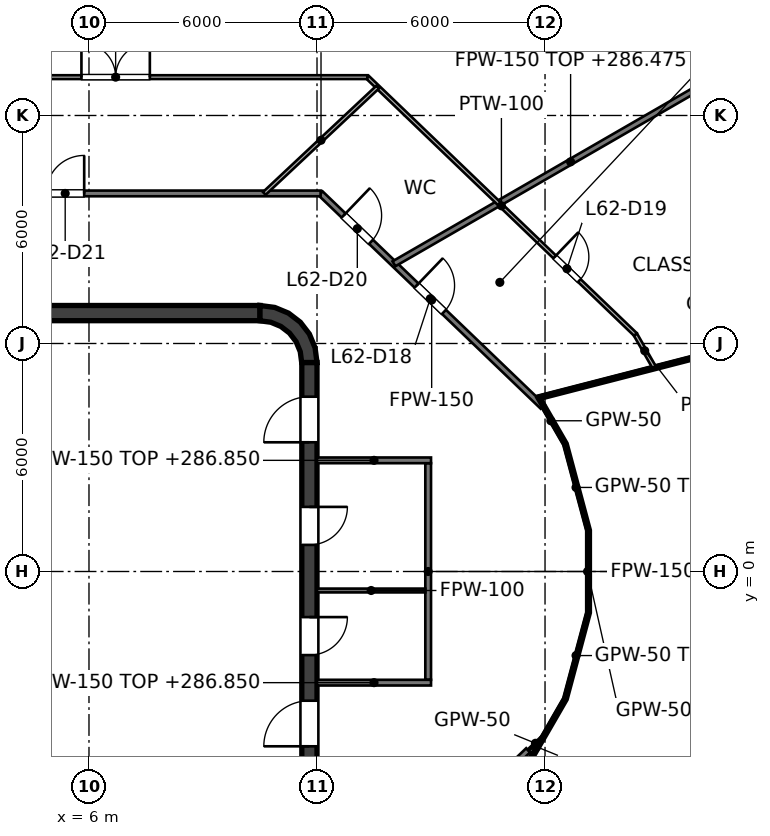
"""IFC4 building model, lengths in metres.
Left out: names, types, materials, properties, quantities, classifications, styles, units other than length and angle.
Written with IfcOpenShell. Run it as: python <this file> out.ifc"""

import sys

from ifc_helpers import new_model, si_unit, direction, frame, frame_2d, origin, place, context, subcontext, project, spatial, polyline, rectangle, outline, extrude, element, fill, save


model = new_model("IFC4")
c1 = context("Model", 3, precision=1e-05, world=origin(), true_north=direction((0.0, 1.0)))
c2 = subcontext(c1, "Body", "Model", "MODEL_VIEW")
j1 = project(units=[si_unit("LENGTHUNIT", "METRE"), si_unit("PLANEANGLEUNIT", "RADIAN")], contexts=[c1])
p1 = place(None, origin())
s1 = spatial("IfcSite", under=j1, at=p1, CompositionType="ELEMENT")
p2 = place(p1, origin())
s2 = spatial("IfcBuilding", under=s1, at=p2, CompositionType="ELEMENT")
p3 = place(p2, frame((0.0, 0.0, 283.0)))
s3 = spatial("IfcBuildingStorey", under=s2, at=p3, CompositionType="ELEMENT", Elevation=283.0)
p4 = place(p3, frame((-10.5, 6.8, 0.0), z_axis=(0.0, 0.0, 1.0), x_axis=(1.0, 0.0, 0.0)))
e1 = element("IfcWall", 1, at=p4, inside=s3, PredefinedType="SHEAR", context=c2, shape_type="SweptSolid", body=[
    extrude(rectangle(XDim=21.0, YDim=0.4, at=frame_2d((10.5, 0.0))), origin(), (0.0, 0.0, 1.0), 4.0),
])
p5 = place(p3, frame((11.8, -5.5, 0.0), z_axis=(0.0, 0.0, 1.0), x_axis=(0.0, 1.0, 0.0)))
e2 = element("IfcWall", 2, at=p5, inside=s3, PredefinedType="SHEAR", context=c2, shape_type="SweptSolid", body=[
    extrude(rectangle(XDim=11.0, YDim=0.4, at=frame_2d((5.5, 0.0))), origin(), (0.0, 0.0, 1.0), 4.0),
])
p6 = place(p5, frame((3.3, 0.0, 0.0)))
e3 = element("IfcOpeningElement", 3, at=p6, cuts=e2, PredefinedType="OPENING", context=c2, shape_type="SweptSolid", body=[
    extrude(rectangle(XDim=1.0, YDim=2.1, at=frame_2d((0.5, 1.05))), frame((0.0, 0.2, 0.0), z_axis=(0.0, -1.0, 0.0), x_axis=(1.0, 0.0, 0.0)), (0.0, 0.0, 1.0), 0.4),
])
p7 = place(p5, frame((6.2, 0.0, 0.0)))
e4 = element("IfcOpeningElement", 4, at=p7, cuts=e2, PredefinedType="OPENING", context=c2, shape_type="SweptSolid", body=[
    extrude(rectangle(XDim=1.0, YDim=2.1, at=frame_2d((0.5, 1.05))), frame((0.0, 0.2, 0.0), z_axis=(0.0, -1.0, 0.0), x_axis=(1.0, 0.0, 0.0)), (0.0, 0.0, 1.0), 0.4),
])
p8 = place(p5, frame((0.9, 0.0, 0.0)))
e5 = element("IfcOpeningElement", 5, at=p8, cuts=e2, PredefinedType="OPENING", context=c2, shape_type="SweptSolid", body=[
    extrude(rectangle(XDim=1.2, YDim=2.1, at=frame_2d((0.6, 1.05))), frame((0.0, 0.2, 0.0), z_axis=(0.0, -1.0, 0.0), x_axis=(1.0, 0.0, 0.0)), (0.0, 0.0, 1.0), 0.4),
])
p9 = place(p5, frame((8.9, 0.0, 0.0)))
e6 = element("IfcOpeningElement", 6, at=p9, cuts=e2, PredefinedType="OPENING", context=c2, shape_type="SweptSolid", body=[
    extrude(rectangle(XDim=1.2, YDim=2.1, at=frame_2d((0.6, 1.05))), frame((0.0, 0.2, 0.0), z_axis=(0.0, -1.0, 0.0), x_axis=(1.0, 0.0, 0.0)), (0.0, 0.0, 1.0), 0.4),
])
p10 = place(p3, origin())
e7 = element("IfcWall", 7, at=p10, inside=s3, PredefinedType="SHEAR", context=c2, shape_type="SweptSolid", body=[
    extrude(outline(polyline([(10.5, 7.0), (10.5, 6.596), (10.784, 6.559), (11.048, 6.45), (11.275, 6.275), (11.45, 6.048), (11.559, 5.784), (11.596, 5.5), (12.0, 5.5), (11.949, 5.888), (11.799, 6.25), (11.561, 6.561), (11.25, 6.799), (10.888, 6.949), (10.5, 7.0)])), origin(), (0.0, 0.0, 1.0), 4.0),
])
p11 = place(p3, frame((9.0, 4.1, 0.0), z_axis=(0.0, 0.0, 1.0), x_axis=(0.0, 1.0, 0.0)))
e8 = element("IfcWall", 8, at=p11, inside=s3, PredefinedType="SOLIDWALL", context=c2, shape_type="SweptSolid", body=[
    extrude(rectangle(XDim=2.5, YDim=0.25, at=frame_2d((1.25, 0.0))), origin(), (0.0, 0.0, 1.0), 3.85),
])
p12 = place(p11, frame((0.65, 0.0, 0.0)))
e9 = element("IfcOpeningElement", 9, at=p12, cuts=e8, PredefinedType="OPENING", context=c2, shape_type="SweptSolid", body=[
    extrude(rectangle(XDim=1.2, YDim=2.1, at=frame_2d((0.6, 1.05))), frame((0.0, 0.125, 0.0), z_axis=(0.0, -1.0, 0.0), x_axis=(1.0, 0.0, 0.0)), (0.0, 0.0, 1.0), 0.25),
])
p13 = place(p3, frame((9.0, -6.6, 0.0), z_axis=(0.0, 0.0, 1.0), x_axis=(0.0, 1.0, 0.0)))
e10 = element("IfcWall", 10, at=p13, inside=s3, PredefinedType="SOLIDWALL", context=c2, shape_type="SweptSolid", body=[
    extrude(rectangle(XDim=2.5, YDim=0.25, at=frame_2d((1.25, 0.0))), origin(), (0.0, 0.0, 1.0), 3.85),
])
p14 = place(p13, frame((0.65, 0.0, 0.0)))
e11 = element("IfcOpeningElement", 11, at=p14, cuts=e10, PredefinedType="OPENING", context=c2, shape_type="SweptSolid", body=[
    extrude(rectangle(XDim=1.2, YDim=2.1, at=frame_2d((0.6, 1.05))), frame((0.0, 0.125, 0.0), z_axis=(0.0, -1.0, 0.0), x_axis=(1.0, 0.0, 0.0)), (0.0, 0.0, 1.0), 0.25),
])
p15 = place(p3, frame((0.775, 1.525, 0.0), z_axis=(0.0, 0.0, 1.0), x_axis=(1.0, 0.0, 0.0)))
e12 = element("IfcWall", 12, at=p15, inside=s3, PredefinedType="SOLIDWALL", context=c2, shape_type="SweptSolid", body=[
    extrude(rectangle(XDim=8.35, YDim=0.25, at=frame_2d((4.175, 0.0))), origin(), (0.0, 0.0, 1.0), 3.85),
])
p16 = place(p15, frame((0.925, 0.0, 0.0)))
e13 = element("IfcOpeningElement", 13, at=p16, cuts=e12, PredefinedType="OPENING", context=c2, shape_type="SweptSolid", body=[
    extrude(rectangle(XDim=1.1, YDim=2.1, at=frame_2d((0.55, 1.05))), frame((0.0, 0.125, 0.0), z_axis=(0.0, -1.0, 0.0), x_axis=(1.0, 0.0, 0.0)), (0.0, 0.0, 1.0), 0.25),
])
p17 = place(p15, frame((3.625, 0.0, 0.0)))
e14 = element("IfcOpeningElement", 14, at=p17, cuts=e12, PredefinedType="OPENING", context=c2, shape_type="SweptSolid", body=[
    extrude(rectangle(XDim=1.1, YDim=2.1, at=frame_2d((0.55, 1.05))), frame((0.0, 0.125, 0.0), z_axis=(0.0, -1.0, 0.0), x_axis=(1.0, 0.0, 0.0)), (0.0, 0.0, 1.0), 0.25),
])
p18 = place(p15, frame((6.325, 0.0, 0.0)))
e15 = element("IfcOpeningElement", 15, at=p18, cuts=e12, PredefinedType="OPENING", context=c2, shape_type="SweptSolid", body=[
    extrude(rectangle(XDim=1.1, YDim=2.1, at=frame_2d((0.55, 1.05))), frame((0.0, 0.125, 0.0), z_axis=(0.0, -1.0, 0.0), x_axis=(1.0, 0.0, 0.0)), (0.0, 0.0, 1.0), 0.25),
])
p19 = place(p3, frame((0.775, 3.975, 0.0), z_axis=(0.0, 0.0, 1.0), x_axis=(1.0, 0.0, 0.0)))
e16 = element("IfcWall", 16, at=p19, inside=s3, PredefinedType="SOLIDWALL", context=c2, shape_type="SweptSolid", body=[
    extrude(rectangle(XDim=8.35, YDim=0.25, at=frame_2d((4.175, 0.0))), origin(), (0.0, 0.0, 1.0), 3.85),
])
for number, where, z_axis, x_axis in (
    (17, (9.0, 1.65, 0.0), (0.0, 0.0, 1.0), (0.0, 1.0, 0.0)),
    (18, (6.3, 1.65, 0.0), (0.0, 0.0, 1.0), (0.0, 1.0, 0.0)),
):
    element("IfcWall", number, at=place(p3, frame(where, z_axis=z_axis, x_axis=x_axis)), inside=s3, PredefinedType="SOLIDWALL", context=c2, shape_type="SweptSolid", body=[
        extrude(rectangle(XDim=2.2, YDim=0.25, at=frame_2d((1.1, 0.0))), origin(), (0.0, 0.0, 1.0), 3.85),
    ])
p20 = place(p3, frame((-9.125, -1.525, 0.0), z_axis=(0.0, 0.0, 1.0), x_axis=(1.0, 0.0, 0.0)))
e19 = element("IfcWall", 19, at=p20, inside=s3, PredefinedType="SOLIDWALL", context=c2, shape_type="SweptSolid", body=[
    extrude(rectangle(XDim=18.25, YDim=0.25, at=frame_2d((9.125, 0.0))), origin(), (0.0, 0.0, 1.0), 3.85),
])
p21 = place(p20, frame((7.15, 0.0, 0.0)))
e20 = element("IfcOpeningElement", 20, at=p21, cuts=e19, PredefinedType="OPENING", context=c2, shape_type="SweptSolid", body=[
    extrude(rectangle(XDim=1.2, YDim=2.1, at=frame_2d((0.6, 1.05))), frame((0.0, 0.125, 0.0), z_axis=(0.0, -1.0, 0.0), x_axis=(1.0, 0.0, 0.0)), (0.0, 0.0, 1.0), 0.25),
])
p22 = place(p20, frame((10.2, 0.0, 0.0)))
e21 = element("IfcOpeningElement", 21, at=p22, cuts=e19, PredefinedType="OPENING", context=c2, shape_type="SweptSolid", body=[
    extrude(rectangle(XDim=1.2, YDim=2.1, at=frame_2d((0.6, 1.05))), frame((0.0, 0.125, 0.0), z_axis=(0.0, -1.0, 0.0), x_axis=(1.0, 0.0, 0.0)), (0.0, 0.0, 1.0), 0.25),
])
p23 = place(p20, frame((16.075, 0.0, 0.0)))
e22 = element("IfcOpeningElement", 22, at=p23, cuts=e19, PredefinedType="OPENING", context=c2, shape_type="SweptSolid", body=[
    extrude(rectangle(XDim=1.0, YDim=2.1, at=frame_2d((0.5, 1.05))), frame((0.0, 0.125, 0.0), z_axis=(0.0, -1.0, 0.0), x_axis=(1.0, 0.0, 0.0)), (0.0, 0.0, 1.0), 0.25),
])
p24 = place(p3, frame((3.275, -3.975, 0.0), z_axis=(0.0, 0.0, 1.0), x_axis=(1.0, 0.0, 0.0)))
e23 = element("IfcWall", 23, at=p24, inside=s3, PredefinedType="SOLIDWALL", context=c2, shape_type="SweptSolid", body=[
    extrude(rectangle(XDim=5.85, YDim=0.25, at=frame_2d((2.925, 0.0))), origin(), (0.0, 0.0, 1.0), 3.85),
])
for number, where, z_axis, x_axis in (
    (24, (5.9, -3.85, 0.0), (0.0, 0.0, 1.0), (0.0, 1.0, 0.0)),
    (25, (9.0, -3.85, 0.0), (0.0, 0.0, 1.0), (0.0, 1.0, 0.0)),
):
    element("IfcWall", number, at=place(p3, frame(where, z_axis=z_axis, x_axis=x_axis)), inside=s3, PredefinedType="SOLIDWALL", context=c2, shape_type="SweptSolid", body=[
        extrude(rectangle(XDim=2.2, YDim=0.25, at=frame_2d((1.1, 0.0))), origin(), (0.0, 0.0, 1.0), 3.85),
    ])
p25 = place(p3, frame((14.925, -2.85, 0.0), z_axis=(0.0, 0.0, 1.0), x_axis=(0.0, 1.0, 0.0)))
e26 = element("IfcWall", 26, at=p25, inside=s3, PredefinedType="PARTITIONING", context=c2, shape_type="SweptSolid", body=[
    extrude(rectangle(XDim=5.7, YDim=0.15, at=frame_2d((2.85, 0.0))), origin(), (0.0, 0.0, 1.0), 2.918),
])
for number, where, z_axis, x_axis in (
    (27, (12.0, 2.925, 0.0), (0.0, 0.0, 1.0), (1.0, 0.0, 0.0)),
    (28, (12.0, -2.925, 0.0), (0.0, 0.0, 1.0), (1.0, 0.0, 0.0)),
):
    element("IfcWall", number, at=place(p3, frame(where, z_axis=z_axis, x_axis=x_axis)), inside=s3, PredefinedType="PARTITIONING", context=c2, shape_type="SweptSolid", body=[
        extrude(rectangle(XDim=3.0, YDim=0.15, at=frame_2d((1.5, 0.0))), origin(), (0.0, 0.0, 1.0), 3.85),
    ])
p26 = place(p3, frame((12.0, -0.5, 0.0), z_axis=(0.0, 0.0, 1.0), x_axis=(1.0, 0.0, 0.0)))
e29 = element("IfcWall", 29, at=p26, inside=s3, PredefinedType="PARTITIONING", context=c2, shape_type="SweptSolid", body=[
    extrude(rectangle(XDim=2.85, YDim=0.1, at=frame_2d((1.425, 0.0))), origin(), (0.0, 0.0, 1.0), 3.85),
])
p27 = place(p3, frame((12.095, 9.949, 0.0), z_axis=(0.0, 0.0, 1.0), x_axis=(0.721304220257, -0.692618381102, 0.0)))
e30 = element("IfcWall", 30, at=p27, inside=s3, PredefinedType="PARTITIONING", context=c2, shape_type="SweptSolid", body=[
    extrude(rectangle(XDim=8.102, YDim=0.15, at=frame_2d((4.051, 0.0))), origin(), (0.0, 0.0, 1.0), 2.927),
])
p28 = place(p27, frame((3.5, 0.0, 0.0)))
e31 = element("IfcOpeningElement", 31, at=p28, cuts=e30, PredefinedType="OPENING", context=c2, shape_type="SweptSolid", body=[
    extrude(rectangle(XDim=1.0, YDim=2.1, at=frame_2d((0.5, 1.05))), frame((0.0, 0.075, 0.0), z_axis=(0.0, -1.0, 0.0), x_axis=(1.0, 0.0, 0.0)), (0.0, 0.0, 1.0), 0.15),
])
p29 = place(p27, frame((0.839, 0.0, 0.0)))
e32 = element("IfcOpeningElement", 32, at=p29, cuts=e30, PredefinedType="OPENING", context=c2, shape_type="SweptSolid", body=[
    extrude(rectangle(XDim=1.0, YDim=2.1, at=frame_2d((0.5, 1.05))), frame((0.0, 0.075, 0.0), z_axis=(0.0, -1.0, 0.0), x_axis=(1.0, 0.0, 0.0)), (0.0, 0.0, 1.0), 0.15),
])
p30 = place(p3, frame((-12.095, 9.949, 0.0), z_axis=(0.0, 0.0, 1.0), x_axis=(1.0, 0.0, 0.0)))
e33 = element("IfcWall", 33, at=p30, inside=s3, PredefinedType="PARTITIONING", context=c2, shape_type="SweptSolid", body=[
    extrude(rectangle(XDim=24.19, YDim=0.15, at=frame_2d((12.095, 0.0))), origin(), (0.0, 0.0, 1.0), 2.927),
])
p31 = place(p30, frame((16.969, 0.0, 0.0)))
e34 = element("IfcOpeningElement", 34, at=p31, cuts=e33, PredefinedType="OPENING", context=c2, shape_type="SweptSolid", body=[
    extrude(rectangle(XDim=1.0, YDim=2.1, at=frame_2d((0.5, 1.05))), frame((0.0, 0.075, 0.0), z_axis=(0.0, -1.0, 0.0), x_axis=(1.0, 0.0, 0.0)), (0.0, 0.0, 1.0), 0.15),
])
p32 = place(p30, frame((10.33, 0.0, 0.0)))
e35 = element("IfcOpeningElement", 35, at=p32, cuts=e33, PredefinedType="OPENING", context=c2, shape_type="SweptSolid", body=[
    extrude(rectangle(XDim=1.0, YDim=2.1, at=frame_2d((0.5, 1.05))), frame((0.0, 0.075, 0.0), z_axis=(0.0, -1.0, 0.0), x_axis=(1.0, 0.0, 0.0)), (0.0, 0.0, 1.0), 0.15),
])
p33 = place(p30, frame((4.215, 0.0, 0.0)))
e36 = element("IfcOpeningElement", 36, at=p33, cuts=e33, PredefinedType="OPENING", context=c2, shape_type="SweptSolid", body=[
    extrude(rectangle(XDim=1.0, YDim=2.1, at=frame_2d((0.5, 1.05))), frame((0.0, 0.075, 0.0), z_axis=(0.0, -1.0, 0.0), x_axis=(1.0, 0.0, 0.0)), (0.0, 0.0, 1.0), 0.15),
])
p34 = place(p3, frame((14.024, 8.097, 0.0), z_axis=(0.0, 0.0, 1.0), x_axis=(0.866029194659, 0.499993433955, 0.0)))
e37 = element("IfcWall", 37, at=p34, inside=s3, PredefinedType="PARTITIONING", context=c2, shape_type="SweptSolid", body=[
    extrude(rectangle(XDim=10.737, YDim=0.15, at=frame_2d((5.368, 0.0))), origin(), (0.0, 0.0, 1.0), 3.475),
])
p35 = place(p3, frame((12.095, -9.949, 0.0), z_axis=(0.0, 0.0, 1.0), x_axis=(0.72124492287, 0.692680129089, 0.0)))
e38 = element("IfcWall", 38, at=p35, inside=s3, PredefinedType="PARTITIONING", context=c2, shape_type="SweptSolid", body=[
    extrude(rectangle(XDim=7.573, YDim=0.15, at=frame_2d((3.786, 0.0))), origin(), (0.0, 0.0, 1.0), 2.927),
])
p36 = place(p3, frame((18.512, 3.345, 0.0), z_axis=(0.0, 0.0, 1.0), x_axis=(0.25873781934, -0.965947587006, 0.0)))
e39 = element("IfcWall", 39, at=p36, inside=s3, PredefinedType="PARTITIONING", context=c2, shape_type="SweptSolid", body=[
    extrude(rectangle(XDim=2.346, YDim=0.05, at=frame_2d((1.173, 0.0))), origin(), (0.0, 0.0, 1.0), 2.918),
])
p37 = place(p3, frame((17.794, 4.588, 0.0), z_axis=(0.0, 0.0, 1.0), x_axis=(0.500218089209, -0.865899453302, 0.0)))
e40 = element("IfcWall", 40, at=p37, inside=s3, PredefinedType="PARTITIONING", context=c2, shape_type="SweptSolid", body=[
    extrude(rectangle(XDim=1.435, YDim=0.05, at=frame_2d((0.718, 0.0))), origin(), (0.0, 0.0, 1.0), 2.927),
])
p38 = place(p3, frame((17.794, 4.588, 0.0), z_axis=(0.0, 0.0, 1.0), x_axis=(0.968309909649, 0.249751714458, 0.0)))
e41 = element("IfcWall", 41, at=p38, inside=s3, PredefinedType="PARTITIONING", context=c2, shape_type="SweptSolid", body=[
    extrude(rectangle(XDim=10.172, YDim=0.05, at=frame_2d((5.086, 0.0))), origin(), (0.0, 0.0, 1.0), 2.927),
])
p39 = place(p3, frame((17.557, -4.704, 0.0), z_axis=(0.0, 0.0, 1.0), x_axis=(0.721018953934, 0.692915339755, 0.0)))
e42 = element("IfcWall", 42, at=p39, inside=s3, PredefinedType="PARTITIONING", context=c2, shape_type="SweptSolid", body=[
    extrude(rectangle(XDim=0.53, YDim=0.05, at=frame_2d((0.265, 0.0))), origin(), (0.0, 0.0, 1.0), 2.927),
])
p40 = place(p3, frame((17.048, -5.88, 0.0), z_axis=(0.0, 0.0, 1.0), x_axis=(0.499987164874, 0.866032814021, 0.0)))
e43 = element("IfcWall", 43, at=p40, inside=s3, PredefinedType="PARTITIONING", context=c2, shape_type="SweptSolid", body=[
    extrude(rectangle(XDim=2.927, YDim=0.05, at=frame_2d((1.464, 0.0))), origin(), (0.0, 0.0, 1.0), 2.927),
])
p41 = place(p3, frame((18.512, -3.345, 0.0), z_axis=(0.0, 0.0, 1.0), x_axis=(0.25873781934, 0.965947587006, 0.0)))
e44 = element("IfcWall", 44, at=p41, inside=s3, PredefinedType="PARTITIONING", context=c2, shape_type="SweptSolid", body=[
    extrude(rectangle(XDim=2.346, YDim=0.05, at=frame_2d((1.173, 0.0))), origin(), (0.0, 0.0, 1.0), 2.918),
])
p42 = place(p3, frame((19.119, -1.079, 0.0), z_axis=(0.0, 0.0, 1.0), x_axis=(0.0, 1.0, 0.0)))
e45 = element("IfcWall", 45, at=p42, inside=s3, PredefinedType="PARTITIONING", context=c2, shape_type="SweptSolid", body=[
    extrude(rectangle(XDim=2.158, YDim=0.05, at=frame_2d((1.079, 0.0))), origin(), (0.0, 0.0, 1.0), 3.85),
])
p43 = place(p3, frame((20.378, 6.237, 0.0), z_axis=(0.0, 0.0, 1.0), x_axis=(0.496805235927, -0.867862061365, 0.0)))
e46 = element("IfcWall", 46, at=p43, inside=s3, PredefinedType="PARTITIONING", context=c2, shape_type="SweptSolid", body=[
    extrude(rectangle(XDim=0.986, YDim=0.1, at=frame_2d((0.493, 0.0))), origin(), (0.0, 0.0, 1.0), 2.927),
])
p44 = place(p3, frame((13.326, 13.009, 0.0), z_axis=(0.0, 0.0, 1.0), x_axis=(0.721367860106, -0.692552099416, 0.0)))
e47 = element("IfcWall", 47, at=p44, inside=s3, PredefinedType="PARTITIONING", context=c2, shape_type="SweptSolid", body=[
    extrude(rectangle(XDim=9.777, YDim=0.1, at=frame_2d((4.889, 0.0))), origin(), (0.0, 0.0, 1.0), 2.927),
])
p45 = place(p44, frame((6.83, 0.0, 0.0)))
e48 = element("IfcOpeningElement", 48, at=p45, cuts=e47, PredefinedType="OPENING", context=c2, shape_type="SweptSolid", body=[
    extrude(rectangle(XDim=0.9, YDim=2.1, at=frame_2d((0.45, 1.05))), frame((0.0, 0.05, 0.0), z_axis=(0.0, -1.0, 0.0), x_axis=(1.0, 0.0, 0.0)), (0.0, 0.0, 1.0), 0.1),
])
p46 = place(p3, frame((-13.326, 13.009, 0.0), z_axis=(0.0, 0.0, 1.0), x_axis=(1.0, 0.0, 0.0)))
e49 = element("IfcWall", 49, at=p46, inside=s3, PredefinedType="PARTITIONING", context=c2, shape_type="SweptSolid", body=[
    extrude(rectangle(XDim=26.652, YDim=0.1, at=frame_2d((13.326, 0.0))), origin(), (0.0, 0.0, 1.0), 2.927),
])
p47 = place(p46, frame((19.127, 0.0, 0.0)))
e50 = element("IfcOpeningElement", 50, at=p47, cuts=e49, PredefinedType="OPENING", context=c2, shape_type="SweptSolid", body=[
    extrude(rectangle(XDim=1.8, YDim=2.1, at=frame_2d((0.9, 1.05))), frame((0.0, 0.05, 0.0), z_axis=(0.0, -1.0, 0.0), x_axis=(1.0, 0.0, 0.0)), (0.0, 0.0, 1.0), 0.1),
])
p48 = place(p3, frame((10.613, 9.949, 0.0), z_axis=(0.0, 0.0, 1.0), x_axis=(0.729444167213, 0.684040354744, 0.0)))
e51 = element("IfcWall", 51, at=p48, inside=s3, PredefinedType="PARTITIONING", context=c2, shape_type="SweptSolid", body=[
    extrude(rectangle(XDim=4.092, YDim=0.1, at=frame_2d((2.046, 0.0))), origin(), (0.0, 0.0, 1.0), 3.85),
])
p49 = place(p17, origin())
e52 = element("IfcDoor", 52, at=p49, inside=s3, OperationType="DOUBLE_DOOR_SLIDING", PredefinedType="DOOR", context=c2, shape_type="SweptSolid", body=[
    extrude(rectangle(XDim=1.1, YDim=2.1, at=frame_2d((0.55, 1.05))), frame((0.0, 0.025, 0.0), z_axis=(0.0, -1.0, 0.0), x_axis=(1.0, 0.0, 0.0)), (0.0, 0.0, 1.0), 0.05),
])
fill(e14, e52)
p50 = place(p18, origin())
e53 = element("IfcDoor", 53, at=p50, inside=s3, OperationType="DOUBLE_DOOR_SLIDING", PredefinedType="DOOR", context=c2, shape_type="SweptSolid", body=[
    extrude(rectangle(XDim=1.1, YDim=2.1, at=frame_2d((0.55, 1.05))), frame((0.0, 0.025, 0.0), z_axis=(0.0, -1.0, 0.0), x_axis=(1.0, 0.0, 0.0)), (0.0, 0.0, 1.0), 0.05),
])
fill(e15, e53)
p51 = place(p12, origin())
e54 = element("IfcDoor", 54, at=p51, inside=s3, OperationType="SINGLE_SWING_LEFT", PredefinedType="DOOR", context=c2, shape_type="SweptSolid", body=[
    extrude(rectangle(XDim=1.2, YDim=2.1, at=frame_2d((0.6, 1.05))), frame((0.0, 0.025, 0.0), z_axis=(0.0, -1.0, 0.0), x_axis=(1.0, 0.0, 0.0)), (0.0, 0.0, 1.0), 0.05),
])
fill(e9, e54)
p52 = place(p14, origin())
e55 = element("IfcDoor", 55, at=p52, inside=s3, OperationType="SINGLE_SWING_LEFT", PredefinedType="DOOR", context=c2, shape_type="SweptSolid", body=[
    extrude(rectangle(XDim=1.2, YDim=2.1, at=frame_2d((0.6, 1.05))), frame((0.0, 0.025, 0.0), z_axis=(0.0, -1.0, 0.0), x_axis=(1.0, 0.0, 0.0)), (0.0, 0.0, 1.0), 0.05),
])
fill(e11, e55)
p53 = place(p23, origin())
e56 = element("IfcDoor", 56, at=p53, inside=s3, OperationType="SINGLE_SWING_RIGHT", PredefinedType="DOOR", context=c2, shape_type="SweptSolid", body=[
    extrude(rectangle(XDim=1.0, YDim=2.1, at=frame_2d((0.5, 1.05))), frame((0.0, 0.025, 0.0), z_axis=(0.0, -1.0, 0.0), x_axis=(1.0, 0.0, 0.0)), (0.0, 0.0, 1.0), 0.05),
])
fill(e22, e56)
p54 = place(p6, origin())
e57 = element("IfcDoor", 57, at=p54, inside=s3, OperationType="SINGLE_SWING_RIGHT", PredefinedType="DOOR", context=c2, shape_type="SweptSolid", body=[
    extrude(rectangle(XDim=1.0, YDim=2.1, at=frame_2d((0.5, 1.05))), frame((0.0, 0.025, 0.0), z_axis=(0.0, -1.0, 0.0), x_axis=(1.0, 0.0, 0.0)), (0.0, 0.0, 1.0), 0.05),
])
fill(e3, e57)
p55 = place(p7, origin())
e58 = element("IfcDoor", 58, at=p55, inside=s3, OperationType="SINGLE_SWING_RIGHT", PredefinedType="DOOR", context=c2, shape_type="SweptSolid", body=[
    extrude(rectangle(XDim=1.0, YDim=2.1, at=frame_2d((0.5, 1.05))), frame((0.0, 0.025, 0.0), z_axis=(0.0, -1.0, 0.0), x_axis=(1.0, 0.0, 0.0)), (0.0, 0.0, 1.0), 0.05),
])
fill(e4, e58)
p56 = place(p8, origin())
e59 = element("IfcDoor", 59, at=p56, inside=s3, OperationType="SINGLE_SWING_LEFT", PredefinedType="DOOR", context=c2, shape_type="SweptSolid", body=[
    extrude(rectangle(XDim=1.2, YDim=2.1, at=frame_2d((0.6, 1.05))), frame((0.0, 0.025, 0.0), z_axis=(0.0, -1.0, 0.0), x_axis=(1.0, 0.0, 0.0)), (0.0, 0.0, 1.0), 0.05),
])
fill(e5, e59)
p57 = place(p9, origin())
e60 = element("IfcDoor", 60, at=p57, inside=s3, OperationType="SINGLE_SWING_LEFT", PredefinedType="DOOR", context=c2, shape_type="SweptSolid", body=[
    extrude(rectangle(XDim=1.2, YDim=2.1, at=frame_2d((0.6, 1.05))), frame((0.0, 0.025, 0.0), z_axis=(0.0, -1.0, 0.0), x_axis=(1.0, 0.0, 0.0)), (0.0, 0.0, 1.0), 0.05),
])
fill(e6, e60)
p58 = place(p28, origin())
e61 = element("IfcDoor", 61, at=p58, inside=s3, OperationType="SINGLE_SWING_LEFT", PredefinedType="DOOR", context=c2, shape_type="SweptSolid", body=[
    extrude(rectangle(XDim=1.0, YDim=2.1, at=frame_2d((0.5, 1.05))), frame((0.0, 0.025, 0.0), z_axis=(0.0, -1.0, 0.0), x_axis=(1.0, 0.0, 0.0)), (0.0, 0.0, 1.0), 0.05),
])
fill(e31, e61)
p59 = place(p45, origin())
e62 = element("IfcDoor", 62, at=p59, inside=s3, OperationType="SINGLE_SWING_LEFT", PredefinedType="DOOR", context=c2, shape_type="SweptSolid", body=[
    extrude(rectangle(XDim=0.9, YDim=2.1, at=frame_2d((0.45, 1.05))), frame((0.0, 0.025, 0.0), z_axis=(0.0, -1.0, 0.0), x_axis=(1.0, 0.0, 0.0)), (0.0, 0.0, 1.0), 0.05),
])
fill(e48, e62)
p60 = place(p29, origin())
e63 = element("IfcDoor", 63, at=p60, inside=s3, OperationType="SINGLE_SWING_LEFT", PredefinedType="DOOR", context=c2, shape_type="SweptSolid", body=[
    extrude(rectangle(XDim=1.0, YDim=2.1, at=frame_2d((0.5, 1.05))), frame((0.0, 0.025, 0.0), z_axis=(0.0, -1.0, 0.0), x_axis=(1.0, 0.0, 0.0)), (0.0, 0.0, 1.0), 0.05),
])
fill(e32, e63)
p61 = place(p31, origin())
e64 = element("IfcDoor", 64, at=p61, inside=s3, OperationType="SINGLE_SWING_RIGHT", PredefinedType="DOOR", context=c2, shape_type="SweptSolid", body=[
    extrude(rectangle(XDim=1.0, YDim=2.1, at=frame_2d((0.5, 1.05))), frame((0.0, 0.025, 0.0), z_axis=(0.0, -1.0, 0.0), x_axis=(1.0, 0.0, 0.0)), (0.0, 0.0, 1.0), 0.05),
])
fill(e34, e64)
p62 = place(p47, origin())
e65 = element("IfcDoor", 65, at=p62, inside=s3, OperationType="DOUBLE_DOOR_SINGLE_SWING", PredefinedType="DOOR", context=c2, shape_type="SweptSolid", body=[
    extrude(rectangle(XDim=1.8, YDim=2.1, at=frame_2d((0.9, 1.05))), frame((0.0, 0.025, 0.0), z_axis=(0.0, -1.0, 0.0), x_axis=(1.0, 0.0, 0.0)), (0.0, 0.0, 1.0), 0.05),
])
fill(e50, e65)
save(model, sys.argv[1])
